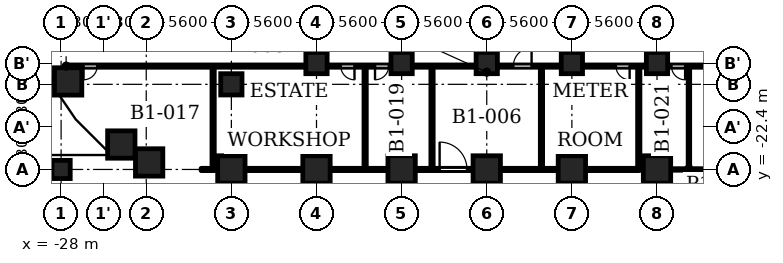
"""IFC4 building model, lengths in metres.
Left out: names, types, materials, properties, quantities, classifications, styles, units other than length and angle.
Written with IfcOpenShell. Run it as: python <this file> out.ifc"""

import sys

from ifc_helpers import new_model, si_unit, direction, frame, frame_2d, origin, origin_2d, place, context, subcontext, project, spatial, polyline, rectangle, circle, outline, extrude, element, fill, save


model = new_model("IFC4")
c1 = context("Model", 3, precision=1e-05, world=origin(), true_north=direction((0.0, 1.0)))
c2 = subcontext(c1, "Body", "Model", "MODEL_VIEW")
j1 = project(units=[si_unit("LENGTHUNIT", "METRE"), si_unit("PLANEANGLEUNIT", "RADIAN")], contexts=[c1])
p1 = place(None, origin())
s1 = spatial("IfcSite", under=j1, at=p1, CompositionType="ELEMENT")
p2 = place(p1, origin())
s2 = spatial("IfcBuilding", under=s1, at=p2, CompositionType="ELEMENT")
p3 = place(p2, frame((0.0, 0.0, -4.5)))
s3 = spatial("IfcBuildingStorey", under=s2, at=p3, CompositionType="ELEMENT", Elevation=-4.5)
p4 = place(p3, frame((0.0, 0.0, -0.5)))
e1 = element("IfcWall", 1, at=p4, inside=s3, PredefinedType="SOLIDWALL", context=c2, shape_type="SweptSolid", body=[
    extrude(outline(polyline([(-26.144, -20.0), (-26.851, -20.0), (-25.901, -20.95), (-30.0, -20.95), (-30.0, -21.45), (-24.688, -21.45), (-24.705, -21.438), (-26.144, -20.0)])), origin(), (0.0, 0.0, 1.0), 5.0),
])
e2 = element("IfcWall", 2, at=p4, inside=s3, PredefinedType="SOLIDWALL", context=c2, shape_type="SweptSolid", body=[
    extrude(outline(polyline([(-28.944, -17.191), (-27.425, -19.426), (-26.851, -20.0), (-26.144, -20.0), (-27.038, -19.105), (-28.472, -16.996), (-28.95, -14.49), (-28.95, -10.0), (-29.45, -10.0), (-29.45, -14.537), (-28.944, -17.191)])), origin(), (0.0, 0.0, 1.0), 5.0),
])
for number, where, z_axis, x_axis in (
    (3, (-22.209, -21.938, 0.0), (0.0, 0.0, 1.0), (1.0, 0.0, 0.0)),
    (4, (-16.8, -22.4, 0.0), (0.0, 0.0, 1.0), (1.0, 0.0, 0.0)),
    (5, (-11.2, -22.4, 0.0), (0.0, 0.0, 1.0), (1.0, 0.0, 0.0)),
    (6, (-5.6, -22.4, 0.0), (0.0, 0.0, 1.0), (1.0, 0.0, 0.0)),
    (7, (0.0, -22.4, 0.0), (0.0, 0.0, 1.0), (1.0, 0.0, 0.0)),
    (8, (5.6, -22.4, 0.0), (0.0, 0.0, 1.0), (1.0, 0.0, 0.0)),
    (9, (11.2, -22.4, 0.0), (0.0, 0.0, 1.0), (1.0, 0.0, 0.0)),
    (10, (-27.538, -16.609, 0.0), (0.0, 0.0, 1.0), (1.0, 0.0, 0.0)),
    (11, (-24.04, -20.76, 0.0), (0.0, 0.0, 1.0), (1.0, 0.0, 0.0)),
):
    element("IfcColumn", number, at=place(p3, frame(where, z_axis=z_axis, x_axis=x_axis)), inside=s3, PredefinedType="COLUMN", context=c2, shape_type="SweptSolid", body=[
        extrude(rectangle(XDim=1.8, YDim=1.8, at=origin_2d()), origin(), (0.0, 0.0, 1.0), 4.5),
    ])
for number, where, z_axis, x_axis in (
    (12, (-16.8, -16.8, 0.0), (0.0, 0.0, 1.0), (1.0, 0.0, 0.0)),
    (13, (-11.2, -15.4, 0.0), (0.0, 0.0, 1.0), (1.0, 0.0, 0.0)),
    (14, (-5.6, -15.4, 0.0), (0.0, 0.0, 1.0), (1.0, 0.0, 0.0)),
    (15, (0.0, -15.4, 0.0), (0.0, 0.0, 1.0), (1.0, 0.0, 0.0)),
    (16, (5.6, -15.4, 0.0), (0.0, 0.0, 1.0), (1.0, 0.0, 0.0)),
    (17, (11.2, -15.4, 0.0), (0.0, 0.0, 1.0), (1.0, 0.0, 0.0)),
):
    element("IfcColumn", number, at=place(p3, frame(where, z_axis=z_axis, x_axis=x_axis)), inside=s3, PredefinedType="COLUMN", context=c2, shape_type="SweptSolid", body=[
        extrude(rectangle(XDim=1.4, YDim=1.4, at=origin_2d()), origin(), (0.0, 0.0, 1.0), 4.5),
    ])
p5 = place(p3, frame((-28.0, -22.4, 0.0), z_axis=(0.0, 0.0, 1.0), x_axis=(1.0, 0.0, 0.0)))
e18 = element("IfcColumn", 18, at=p5, inside=s3, PredefinedType="COLUMN", context=c2, shape_type="SweptSolid", body=[
    extrude(circle(Radius=0.6, at=origin_2d()), origin(), (0.0, 0.0, 1.0), 4.5),
])
p6 = place(p3, frame((10.0, -22.4, 0.0), z_axis=(0.0, 0.0, 1.0), x_axis=(1.0, 0.0, 0.0)))
e19 = element("IfcWall", 19, at=p6, inside=s3, PredefinedType="PARTITIONING", context=c2, shape_type="SweptSolid", body=[
    extrude(rectangle(XDim=6.6, YDim=0.1, at=frame_2d((3.3, 0.0))), origin(), (0.0, 0.0, 1.0), 3.15),
])
p7 = place(p3, frame((-18.79, -22.4, 0.0), z_axis=(0.0, 0.0, 1.0), x_axis=(1.0, 0.0, 0.0)))
e20 = element("IfcWall", 20, at=p7, inside=s3, PredefinedType="PARTITIONING", context=c2, shape_type="SweptSolid", body=[
    extrude(rectangle(XDim=28.79, YDim=0.15, at=frame_2d((14.395, 0.0))), origin(), (0.0, 0.0, 1.0), 3.15),
])
p8 = place(p7, frame((15.69, 0.0, 0.0)))
e21 = element("IfcOpeningElement", 21, at=p8, cuts=e20, PredefinedType="OPENING", context=c2, shape_type="SweptSolid", body=[
    extrude(rectangle(XDim=1.8, YDim=2.1, at=frame_2d((0.9, 1.05))), frame((0.0, 0.085, 0.0), z_axis=(0.0, -1.0, 0.0), x_axis=(1.0, 0.0, 0.0)), (0.0, 0.0, 1.0), 0.17),
])
p9 = place(p3, frame((-27.67, -15.6, 0.0), z_axis=(0.0, 0.0, 1.0), x_axis=(1.0, 0.0, 0.0)))
e22 = element("IfcWall", 22, at=p9, inside=s3, PredefinedType="PARTITIONING", context=c2, shape_type="SweptSolid", body=[
    extrude(rectangle(XDim=44.27, YDim=0.15, at=frame_2d((22.135, 0.0))), origin(), (0.0, 0.0, 1.0), 4.05),
])
p10 = place(p9, frame((29.42, 0.0, 0.0)))
e23 = element("IfcOpeningElement", 23, at=p10, cuts=e22, PredefinedType="OPENING", context=c2, shape_type="SweptSolid", body=[
    extrude(rectangle(XDim=1.2, YDim=2.1, at=frame_2d((0.6, 1.05))), frame((0.0, 0.085, 0.0), z_axis=(0.0, -1.0, 0.0), x_axis=(1.0, 0.0, 0.0)), (0.0, 0.0, 1.0), 0.17),
])
p11 = place(p9, frame((1.141, 0.0, 0.0)))
e24 = element("IfcOpeningElement", 24, at=p11, cuts=e22, PredefinedType="OPENING", context=c2, shape_type="SweptSolid", body=[
    extrude(rectangle(XDim=0.9, YDim=2.1, at=frame_2d((0.45, 1.05))), frame((0.0, 0.085, 0.0), z_axis=(0.0, -1.0, 0.0), x_axis=(1.0, 0.0, 0.0)), (0.0, 0.0, 1.0), 0.17),
])
p12 = place(p9, frame((18.07, 0.0, 0.0)))
e25 = element("IfcOpeningElement", 25, at=p12, cuts=e22, PredefinedType="OPENING", context=c2, shape_type="SweptSolid", body=[
    extrude(rectangle(XDim=0.9, YDim=2.1, at=frame_2d((0.45, 1.05))), frame((0.0, 0.085, 0.0), z_axis=(0.0, -1.0, 0.0), x_axis=(1.0, 0.0, 0.0)), (0.0, 0.0, 1.0), 0.17),
])
p13 = place(p9, frame((20.32, 0.0, 0.0)))
e26 = element("IfcOpeningElement", 26, at=p13, cuts=e22, PredefinedType="OPENING", context=c2, shape_type="SweptSolid", body=[
    extrude(rectangle(XDim=0.9, YDim=2.1, at=frame_2d((0.45, 1.05))), frame((0.0, 0.085, 0.0), z_axis=(0.0, -1.0, 0.0), x_axis=(1.0, 0.0, 0.0)), (0.0, 0.0, 1.0), 0.17),
])
p14 = place(p9, frame((36.17, 0.0, 0.0)))
e27 = element("IfcOpeningElement", 27, at=p14, cuts=e22, PredefinedType="OPENING", context=c2, shape_type="SweptSolid", body=[
    extrude(rectangle(XDim=0.9, YDim=2.1, at=frame_2d((0.45, 1.05))), frame((0.0, 0.085, 0.0), z_axis=(0.0, -1.0, 0.0), x_axis=(1.0, 0.0, 0.0)), (0.0, 0.0, 1.0), 0.17),
])
p15 = place(p9, frame((39.82, 0.0, 0.0)))
e28 = element("IfcOpeningElement", 28, at=p15, cuts=e22, PredefinedType="OPENING", context=c2, shape_type="SweptSolid", body=[
    extrude(rectangle(XDim=0.9, YDim=2.1, at=frame_2d((0.45, 1.05))), frame((0.0, 0.085, 0.0), z_axis=(0.0, -1.0, 0.0), x_axis=(1.0, 0.0, 0.0)), (0.0, 0.0, 1.0), 0.17),
])
p16 = place(p9, frame((42.62, 0.0, 0.0)))
e29 = element("IfcOpeningElement", 29, at=p16, cuts=e22, PredefinedType="OPENING", context=c2, shape_type="SweptSolid", body=[
    extrude(rectangle(XDim=0.9, YDim=2.1, at=frame_2d((0.45, 1.05))), frame((0.0, 0.085, 0.0), z_axis=(0.0, -1.0, 0.0), x_axis=(1.0, 0.0, 0.0)), (0.0, 0.0, 1.0), 0.17),
])
for number, where, z_axis, x_axis in (
    (30, (-18.0, -22.325, 0.0), (0.0, 0.0, 1.0), (0.0, 1.0, 0.0)),
    (31, (-8.0, -22.325, 0.0), (0.0, 0.0, 1.0), (0.0, 1.0, 0.0)),
    (32, (-3.6, -22.325, 0.0), (0.0, 0.0, 1.0), (0.0, 1.0, 0.0)),
    (33, (3.6, -22.325, 0.0), (0.0, 0.0, 1.0), (0.0, 1.0, 0.0)),
):
    element("IfcWall", number, at=place(p3, frame(where, z_axis=z_axis, x_axis=x_axis)), inside=s3, PredefinedType="PARTITIONING", context=c2, shape_type="SweptSolid", body=[
        extrude(rectangle(XDim=6.65, YDim=0.15, at=frame_2d((3.325, 0.0))), origin(), (0.0, 0.0, 1.0), 4.05),
    ])
p17 = place(p3, frame((10.0, -22.35, 0.0), z_axis=(0.0, 0.0, 1.0), x_axis=(0.0, 1.0, 0.0)))
e34 = element("IfcWall", 34, at=p17, inside=s3, PredefinedType="PARTITIONING", context=c2, shape_type="SweptSolid", body=[
    extrude(rectangle(XDim=6.675, YDim=0.15, at=frame_2d((3.337, 0.0))), origin(), (0.0, 0.0, 1.0), 4.05),
])
p18 = place(p3, frame((13.3, -22.35, 0.0), z_axis=(0.0, 0.0, 1.0), x_axis=(0.0, 1.0, 0.0)))
e35 = element("IfcWall", 35, at=p18, inside=s3, PredefinedType="PARTITIONING", context=c2, shape_type="SweptSolid", body=[
    extrude(rectangle(XDim=6.675, YDim=0.1, at=frame_2d((3.337, 0.0))), origin(), (0.0, 0.0, 1.0), 4.05),
])
p19 = place(p10, origin())
e36 = element("IfcDoor", 36, at=p19, inside=s3, OperationType="SINGLE_SWING_LEFT", PredefinedType="DOOR", context=c2, shape_type="SweptSolid", body=[
    extrude(rectangle(XDim=1.2, YDim=2.1, at=frame_2d((0.6, 1.05))), frame((0.0, 0.025, 0.0), z_axis=(0.0, -1.0, 0.0), x_axis=(1.0, 0.0, 0.0)), (0.0, 0.0, 1.0), 0.05),
])
fill(e23, e36)
p20 = place(p8, origin())
e37 = element("IfcDoor", 37, at=p20, inside=s3, OperationType="SINGLE_SWING_RIGHT", PredefinedType="DOOR", context=c2, shape_type="SweptSolid", body=[
    extrude(rectangle(XDim=1.8, YDim=2.1, at=frame_2d((0.9, 1.05))), frame((0.0, 0.025, 0.0), z_axis=(0.0, -1.0, 0.0), x_axis=(1.0, 0.0, 0.0)), (0.0, 0.0, 1.0), 0.05),
])
fill(e21, e37)
p21 = place(p11, origin())
e38 = element("IfcDoor", 38, at=p21, inside=s3, OperationType="SINGLE_SWING_LEFT", PredefinedType="DOOR", context=c2, shape_type="SweptSolid", body=[
    extrude(rectangle(XDim=0.9, YDim=2.1, at=frame_2d((0.45, 1.05))), frame((0.0, 0.025, 0.0), z_axis=(0.0, -1.0, 0.0), x_axis=(1.0, 0.0, 0.0)), (0.0, 0.0, 1.0), 0.05),
])
fill(e24, e38)
p22 = place(p12, origin())
e39 = element("IfcDoor", 39, at=p22, inside=s3, OperationType="SINGLE_SWING_RIGHT", PredefinedType="DOOR", context=c2, shape_type="SweptSolid", body=[
    extrude(rectangle(XDim=0.9, YDim=2.1, at=frame_2d((0.45, 1.05))), frame((0.0, 0.025, 0.0), z_axis=(0.0, -1.0, 0.0), x_axis=(1.0, 0.0, 0.0)), (0.0, 0.0, 1.0), 0.05),
])
fill(e25, e39)
p23 = place(p13, origin())
e40 = element("IfcDoor", 40, at=p23, inside=s3, OperationType="SINGLE_SWING_LEFT", PredefinedType="DOOR", context=c2, shape_type="SweptSolid", body=[
    extrude(rectangle(XDim=0.9, YDim=2.1, at=frame_2d((0.45, 1.05))), frame((0.0, 0.025, 0.0), z_axis=(0.0, -1.0, 0.0), x_axis=(1.0, 0.0, 0.0)), (0.0, 0.0, 1.0), 0.05),
])
fill(e26, e40)
p24 = place(p14, origin())
e41 = element("IfcDoor", 41, at=p24, inside=s3, OperationType="SINGLE_SWING_RIGHT", PredefinedType="DOOR", context=c2, shape_type="SweptSolid", body=[
    extrude(rectangle(XDim=0.9, YDim=2.1, at=frame_2d((0.45, 1.05))), frame((0.0, 0.025, 0.0), z_axis=(0.0, -1.0, 0.0), x_axis=(1.0, 0.0, 0.0)), (0.0, 0.0, 1.0), 0.05),
])
fill(e27, e41)
p25 = place(p15, origin())
e42 = element("IfcDoor", 42, at=p25, inside=s3, OperationType="SINGLE_SWING_RIGHT", PredefinedType="DOOR", context=c2, shape_type="SweptSolid", body=[
    extrude(rectangle(XDim=0.9, YDim=2.1, at=frame_2d((0.45, 1.05))), frame((0.0, 0.025, 0.0), z_axis=(0.0, -1.0, 0.0), x_axis=(1.0, 0.0, 0.0)), (0.0, 0.0, 1.0), 0.05),
])
fill(e28, e42)
save(model, sys.argv[1])
